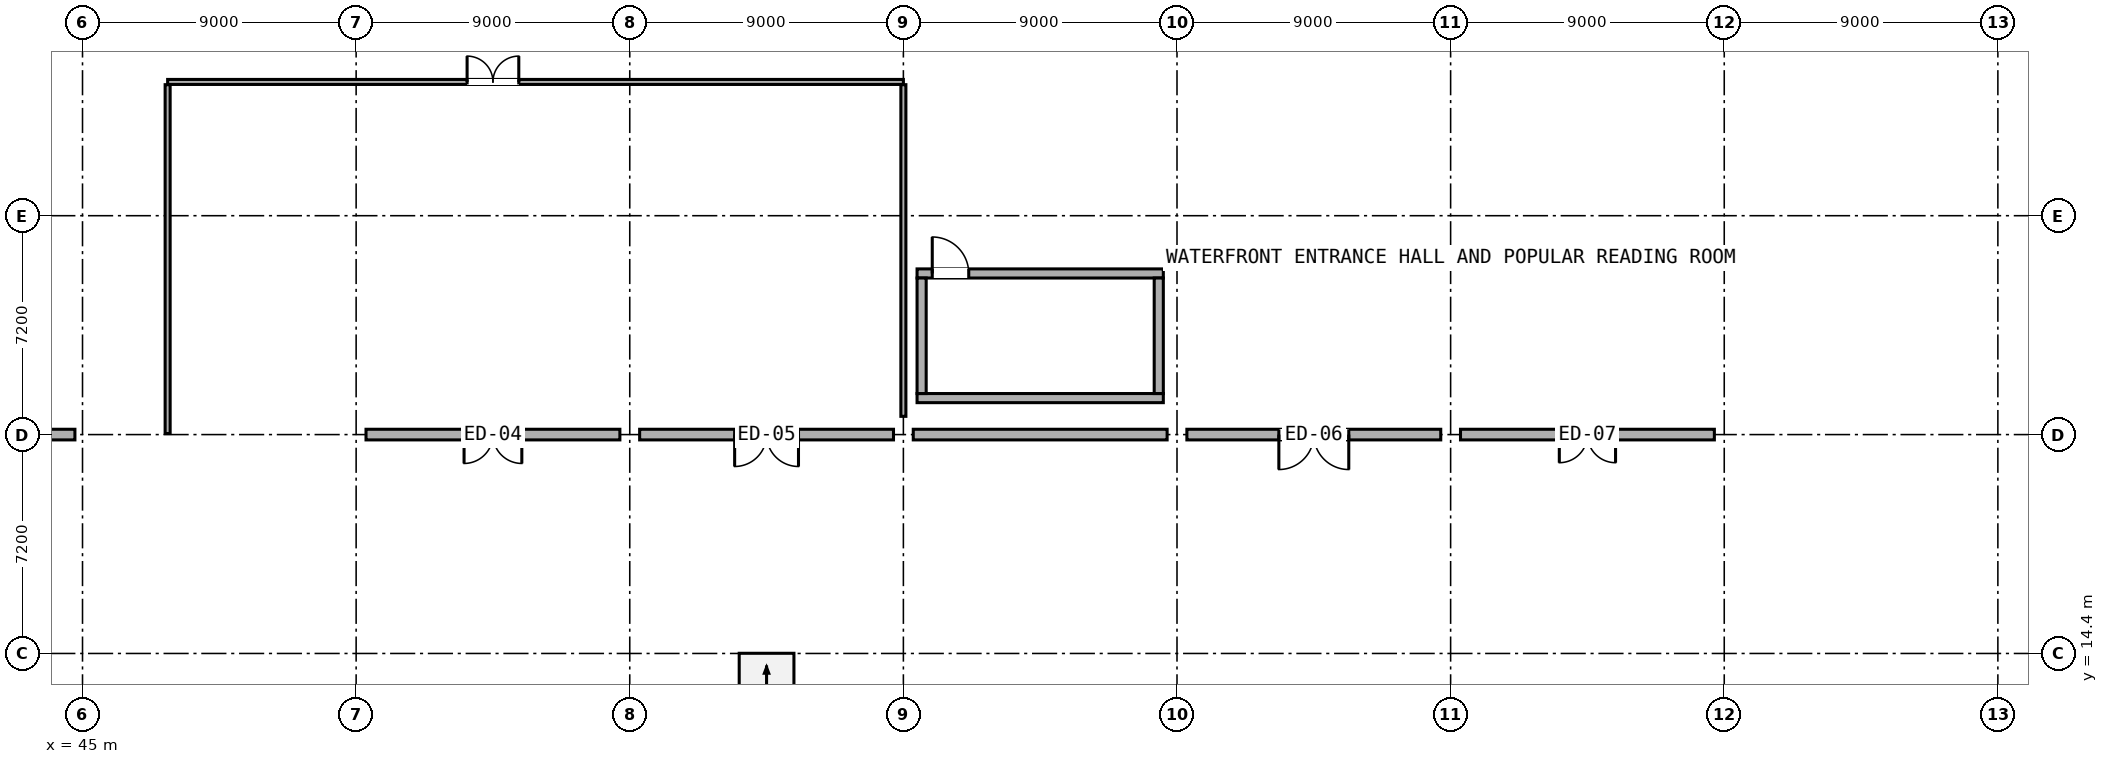
"""IFC4 building model, lengths in metres.
Left out: names, types, materials, properties, quantities, classifications, styles, units other than length and angle.
Written with IfcOpenShell. Run it as: python <this file> out.ifc"""

import sys

from ifc_helpers import new_model, si_unit, direction, frame, frame_2d, origin, origin_2d, place, context, subcontext, project, spatial, rectangle, hollow_rectangle, extrude, element, fill, save


model = new_model("IFC4")
c1 = context("Model", 3, precision=1e-05, world=origin(), true_north=direction((0.0, 1.0)))
c2 = subcontext(c1, "Body", "Model", "MODEL_VIEW")
j1 = project(units=[si_unit("LENGTHUNIT", "METRE"), si_unit("PLANEANGLEUNIT", "RADIAN")], contexts=[c1])
p1 = place(None, origin())
s1 = spatial("IfcSite", under=j1, at=p1, CompositionType="ELEMENT")
p2 = place(p1, origin())
s2 = spatial("IfcBuilding", under=s1, at=p2, CompositionType="ELEMENT")
p3 = place(p2, origin())
s3 = spatial("IfcBuildingStorey", under=s2, at=p3, CompositionType="ELEMENT", Elevation=0.0)
p4 = place(p3, frame((45.0, 14.4, 0.0), z_axis=(0.0, 0.0, 1.0), x_axis=(1.0, 0.0, 0.0)))
e1 = element("IfcColumn", 1, at=p4, inside=s3, PredefinedType="COLUMN", context=c2, shape_type="SweptSolid", body=[
    extrude(hollow_rectangle(XDim=0.5, YDim=0.5, WallThickness=0.022, at=origin_2d()), origin(), (0.0, 0.0, 1.0), 4.58),
])
for number, where, z_axis, x_axis in (
    (2, (45.0, 21.6, 0.0), (0.0, 0.0, 1.0), (1.0, 0.0, 0.0)),
    (3, (45.0, 28.8, 0.0), (0.0, 0.0, 1.0), (1.0, 0.0, 0.0)),
):
    element("IfcColumn", number, at=place(p3, frame(where, z_axis=z_axis, x_axis=x_axis)), inside=s3, PredefinedType="COLUMN", context=c2, shape_type="SweptSolid", body=[
        extrude(hollow_rectangle(XDim=0.5, YDim=0.5, WallThickness=0.022, at=origin_2d()), origin(), (0.0, 0.0, 1.0), 4.8),
    ])
p5 = place(p3, frame((54.0, 14.4, 0.0), z_axis=(0.0, 0.0, 1.0), x_axis=(1.0, 0.0, 0.0)))
e4 = element("IfcColumn", 4, at=p5, inside=s3, PredefinedType="COLUMN", context=c2, shape_type="SweptSolid", body=[
    extrude(hollow_rectangle(XDim=0.65, YDim=0.65, WallThickness=0.025, at=origin_2d()), origin(), (0.0, 0.0, 1.0), 4.58),
])
for number, where, z_axis, x_axis in (
    (5, (54.0, 21.6, 0.0), (0.0, 0.0, 1.0), (1.0, 0.0, 0.0)),
    (6, (54.0, 28.8, 0.0), (0.0, 0.0, 1.0), (1.0, 0.0, 0.0)),
):
    element("IfcColumn", number, at=place(p3, frame(where, z_axis=z_axis, x_axis=x_axis)), inside=s3, PredefinedType="COLUMN", context=c2, shape_type="SweptSolid", body=[
        extrude(hollow_rectangle(XDim=0.65, YDim=0.65, WallThickness=0.025, at=origin_2d()), origin(), (0.0, 0.0, 1.0), 4.8),
    ])
p6 = place(p3, frame((63.0, 14.4, 0.0), z_axis=(0.0, 0.0, 1.0), x_axis=(1.0, 0.0, 0.0)))
e7 = element("IfcColumn", 7, at=p6, inside=s3, PredefinedType="COLUMN", context=c2, shape_type="SweptSolid", body=[
    extrude(hollow_rectangle(XDim=0.65, YDim=0.65, WallThickness=0.025, at=origin_2d()), origin(), (0.0, 0.0, 1.0), 4.58),
])
for number, where, z_axis, x_axis in (
    (8, (63.0, 21.6, 0.0), (0.0, 0.0, 1.0), (1.0, 0.0, 0.0)),
    (9, (63.0, 28.8, 0.0), (0.0, 0.0, 1.0), (1.0, 0.0, 0.0)),
):
    element("IfcColumn", number, at=place(p3, frame(where, z_axis=z_axis, x_axis=x_axis)), inside=s3, PredefinedType="COLUMN", context=c2, shape_type="SweptSolid", body=[
        extrude(hollow_rectangle(XDim=0.65, YDim=0.65, WallThickness=0.025, at=origin_2d()), origin(), (0.0, 0.0, 1.0), 4.8),
    ])
p7 = place(p3, frame((72.0, 14.4, 0.0), z_axis=(0.0, 0.0, 1.0), x_axis=(1.0, 0.0, 0.0)))
e10 = element("IfcColumn", 10, at=p7, inside=s3, PredefinedType="COLUMN", context=c2, shape_type="SweptSolid", body=[
    extrude(hollow_rectangle(XDim=0.65, YDim=0.65, WallThickness=0.025, at=origin_2d()), origin(), (0.0, 0.0, 1.0), 4.58),
])
for number, where, z_axis, x_axis in (
    (11, (72.0, 21.6, 0.0), (0.0, 0.0, 1.0), (1.0, 0.0, 0.0)),
    (12, (72.0, 28.8, 0.0), (0.0, 0.0, 1.0), (1.0, 0.0, 0.0)),
):
    element("IfcColumn", number, at=place(p3, frame(where, z_axis=z_axis, x_axis=x_axis)), inside=s3, PredefinedType="COLUMN", context=c2, shape_type="SweptSolid", body=[
        extrude(hollow_rectangle(XDim=0.65, YDim=0.65, WallThickness=0.025, at=origin_2d()), origin(), (0.0, 0.0, 1.0), 4.8),
    ])
p8 = place(p3, frame((81.0, 14.4, 0.0), z_axis=(0.0, 0.0, 1.0), x_axis=(1.0, 0.0, 0.0)))
e13 = element("IfcColumn", 13, at=p8, inside=s3, PredefinedType="COLUMN", context=c2, shape_type="SweptSolid", body=[
    extrude(hollow_rectangle(XDim=0.65, YDim=0.65, WallThickness=0.025, at=origin_2d()), origin(), (0.0, 0.0, 1.0), 4.58),
])
for number, where, z_axis, x_axis in (
    (14, (81.0, 21.6, 0.0), (0.0, 0.0, 1.0), (1.0, 0.0, 0.0)),
    (15, (81.0, 28.8, 0.0), (0.0, 0.0, 1.0), (1.0, 0.0, 0.0)),
):
    element("IfcColumn", number, at=place(p3, frame(where, z_axis=z_axis, x_axis=x_axis)), inside=s3, PredefinedType="COLUMN", context=c2, shape_type="SweptSolid", body=[
        extrude(hollow_rectangle(XDim=0.65, YDim=0.65, WallThickness=0.025, at=origin_2d()), origin(), (0.0, 0.0, 1.0), 4.8),
    ])
p9 = place(p3, frame((90.0, 14.4, 0.0), z_axis=(0.0, 0.0, 1.0), x_axis=(1.0, 0.0, 0.0)))
e16 = element("IfcColumn", 16, at=p9, inside=s3, PredefinedType="COLUMN", context=c2, shape_type="SweptSolid", body=[
    extrude(hollow_rectangle(XDim=0.65, YDim=0.65, WallThickness=0.025, at=origin_2d()), origin(), (0.0, 0.0, 1.0), 4.58),
])
for number, where, z_axis, x_axis in (
    (17, (90.0, 21.6, 0.0), (0.0, 0.0, 1.0), (1.0, 0.0, 0.0)),
    (18, (90.0, 28.8, 0.0), (0.0, 0.0, 1.0), (1.0, 0.0, 0.0)),
):
    element("IfcColumn", number, at=place(p3, frame(where, z_axis=z_axis, x_axis=x_axis)), inside=s3, PredefinedType="COLUMN", context=c2, shape_type="SweptSolid", body=[
        extrude(hollow_rectangle(XDim=0.65, YDim=0.65, WallThickness=0.025, at=origin_2d()), origin(), (0.0, 0.0, 1.0), 4.8),
    ])
p10 = place(p3, frame((99.0, 14.4, 0.0), z_axis=(0.0, 0.0, 1.0), x_axis=(1.0, 0.0, 0.0)))
e19 = element("IfcColumn", 19, at=p10, inside=s3, PredefinedType="COLUMN", context=c2, shape_type="SweptSolid", body=[
    extrude(hollow_rectangle(XDim=0.65, YDim=0.65, WallThickness=0.025, at=origin_2d()), origin(), (0.0, 0.0, 1.0), 4.58),
])
for number, where, z_axis, x_axis in (
    (20, (99.0, 21.6, 0.0), (0.0, 0.0, 1.0), (1.0, 0.0, 0.0)),
    (21, (99.0, 28.8, 0.0), (0.0, 0.0, 1.0), (1.0, 0.0, 0.0)),
):
    element("IfcColumn", number, at=place(p3, frame(where, z_axis=z_axis, x_axis=x_axis)), inside=s3, PredefinedType="COLUMN", context=c2, shape_type="SweptSolid", body=[
        extrude(hollow_rectangle(XDim=0.65, YDim=0.65, WallThickness=0.025, at=origin_2d()), origin(), (0.0, 0.0, 1.0), 4.8),
    ])
p11 = place(p3, frame((108.0, 14.4, 0.0), z_axis=(0.0, 0.0, 1.0), x_axis=(1.0, 0.0, 0.0)))
e22 = element("IfcColumn", 22, at=p11, inside=s3, PredefinedType="COLUMN", context=c2, shape_type="SweptSolid", body=[
    extrude(hollow_rectangle(XDim=0.5, YDim=0.5, WallThickness=0.022, at=origin_2d()), origin(), (0.0, 0.0, 1.0), 4.58),
])
for number, where, z_axis, x_axis in (
    (23, (108.0, 21.6, 0.0), (0.0, 0.0, 1.0), (1.0, 0.0, 0.0)),
    (24, (108.0, 28.8, 0.0), (0.0, 0.0, 1.0), (1.0, 0.0, 0.0)),
):
    element("IfcColumn", number, at=place(p3, frame(where, z_axis=z_axis, x_axis=x_axis)), inside=s3, PredefinedType="COLUMN", context=c2, shape_type="SweptSolid", body=[
        extrude(hollow_rectangle(XDim=0.5, YDim=0.5, WallThickness=0.022, at=origin_2d()), origin(), (0.0, 0.0, 1.0), 4.8),
    ])
p12 = place(p3, frame((36.25, 21.6, 0.0), z_axis=(0.0, 0.0, 1.0), x_axis=(1.0, 0.0, 0.0)))
e25 = element("IfcWall", 25, at=p12, inside=s3, PredefinedType="STANDARD", context=c2, shape_type="SweptSolid", body=[
    extrude(rectangle(XDim=8.5, YDim=0.35, at=frame_2d((4.25, 0.0))), origin(), (0.0, 0.0, 1.0), 4.055),
])
p13 = place(p12, frame((3.05, 0.0, 0.0)))
e26 = element("IfcOpeningElement", 26, at=p13, cuts=e25, PredefinedType="OPENING", context=c2, shape_type="SweptSolid", body=[
    extrude(rectangle(XDim=2.4, YDim=2.55, at=frame_2d((1.2, 1.275))), frame((0.0, 0.187, 0.0), z_axis=(0.0, -1.0, 0.0), x_axis=(1.0, 0.0, 0.0)), (0.0, 0.0, 1.0), 0.374),
])
p14 = place(p3, frame((54.325, 21.6, 0.0), z_axis=(0.0, 0.0, 1.0), x_axis=(1.0, 0.0, 0.0)))
e27 = element("IfcWall", 27, at=p14, inside=s3, PredefinedType="STANDARD", context=c2, shape_type="SweptSolid", body=[
    extrude(rectangle(XDim=8.35, YDim=0.35, at=frame_2d((4.175, 0.0))), origin(), (0.0, 0.0, 1.0), 3.955),
])
p15 = place(p14, frame((3.225, 0.0, 0.0)))
e28 = element("IfcOpeningElement", 28, at=p15, cuts=e27, PredefinedType="OPENING", context=c2, shape_type="SweptSolid", body=[
    extrude(rectangle(XDim=1.9, YDim=2.4, at=frame_2d((0.95, 1.2))), frame((0.0, 0.187, 0.0), z_axis=(0.0, -1.0, 0.0), x_axis=(1.0, 0.0, 0.0)), (0.0, 0.0, 1.0), 0.374),
])
p16 = place(p3, frame((63.325, 21.6, 0.0), z_axis=(0.0, 0.0, 1.0), x_axis=(1.0, 0.0, 0.0)))
e29 = element("IfcWall", 29, at=p16, inside=s3, PredefinedType="STANDARD", context=c2, shape_type="SweptSolid", body=[
    extrude(rectangle(XDim=8.35, YDim=0.35, at=frame_2d((4.175, 0.0))), origin(), (0.0, 0.0, 1.0), 3.955),
])
p17 = place(p16, frame((3.125, 0.0, 0.0)))
e30 = element("IfcOpeningElement", 30, at=p17, cuts=e29, PredefinedType="OPENING", context=c2, shape_type="SweptSolid", body=[
    extrude(rectangle(XDim=2.1, YDim=2.45, at=frame_2d((1.05, 1.225))), frame((0.0, 0.187, 0.0), z_axis=(0.0, -1.0, 0.0), x_axis=(1.0, 0.0, 0.0)), (0.0, 0.0, 1.0), 0.374),
])
p18 = place(p3, frame((72.325, 21.6, 0.0), z_axis=(0.0, 0.0, 1.0), x_axis=(1.0, 0.0, 0.0)))
e31 = element("IfcWall", 31, at=p18, inside=s3, PredefinedType="STANDARD", context=c2, shape_type="SweptSolid", body=[
    extrude(rectangle(XDim=8.35, YDim=0.35, at=frame_2d((4.175, 0.0))), origin(), (0.0, 0.0, 1.0), 3.955),
])
p19 = place(p3, frame((81.325, 21.6, 0.0), z_axis=(0.0, 0.0, 1.0), x_axis=(1.0, 0.0, 0.0)))
e32 = element("IfcWall", 32, at=p19, inside=s3, PredefinedType="STANDARD", context=c2, shape_type="SweptSolid", body=[
    extrude(rectangle(XDim=8.35, YDim=0.35, at=frame_2d((4.175, 0.0))), origin(), (0.0, 0.0, 1.0), 3.955),
])
p20 = place(p19, frame((3.025, 0.0, 0.0)))
e33 = element("IfcOpeningElement", 33, at=p20, cuts=e32, PredefinedType="OPENING", context=c2, shape_type="SweptSolid", body=[
    extrude(rectangle(XDim=2.3, YDim=2.5, at=frame_2d((1.15, 1.25))), frame((0.0, 0.187, 0.0), z_axis=(0.0, -1.0, 0.0), x_axis=(1.0, 0.0, 0.0)), (0.0, 0.0, 1.0), 0.374),
])
p21 = place(p3, frame((90.325, 21.6, 0.0), z_axis=(0.0, 0.0, 1.0), x_axis=(1.0, 0.0, 0.0)))
e34 = element("IfcWall", 34, at=p21, inside=s3, PredefinedType="STANDARD", context=c2, shape_type="SweptSolid", body=[
    extrude(rectangle(XDim=8.35, YDim=0.35, at=frame_2d((4.175, 0.0))), origin(), (0.0, 0.0, 1.0), 3.955),
])
p22 = place(p21, frame((3.25, 0.0, 0.0)))
e35 = element("IfcOpeningElement", 35, at=p22, cuts=e34, PredefinedType="OPENING", context=c2, shape_type="SweptSolid", body=[
    extrude(rectangle(XDim=1.85, YDim=2.35, at=frame_2d((0.925, 1.175))), frame((0.0, 0.187, 0.0), z_axis=(0.0, -1.0, 0.0), x_axis=(1.0, 0.0, 0.0)), (0.0, 0.0, 1.0), 0.374),
])
p23 = place(p3, frame((72.45, 22.8, 0.0), z_axis=(0.0, 0.0, 1.0), x_axis=(1.0, 0.0, 0.0)))
e36 = element("IfcWall", 36, at=p23, inside=s3, PredefinedType="SHEAR", context=c2, shape_type="SweptSolid", body=[
    extrude(rectangle(XDim=8.1, YDim=0.3, at=frame_2d((4.05, 0.0))), origin(), (0.0, 0.0, 1.0), 4.555),
])
p24 = place(p3, frame((72.45, 26.9, 0.0), z_axis=(0.0, 0.0, 1.0), x_axis=(1.0, 0.0, 0.0)))
e37 = element("IfcWall", 37, at=p24, inside=s3, PredefinedType="SHEAR", context=c2, shape_type="SweptSolid", body=[
    extrude(rectangle(XDim=8.1, YDim=0.3, at=frame_2d((4.05, 0.0))), origin(), (0.0, 0.0, 1.0), 4.555),
])
p25 = place(p24, frame((0.5, 0.0, 0.0)))
e38 = element("IfcOpeningElement", 38, at=p25, cuts=e37, PredefinedType="OPENING", context=c2, shape_type="SweptSolid", body=[
    extrude(rectangle(XDim=1.2, YDim=2.1, at=frame_2d((0.6, 1.05))), frame((0.0, 0.162, 0.0), z_axis=(0.0, -1.0, 0.0), x_axis=(1.0, 0.0, 0.0)), (0.0, 0.0, 1.0), 0.324),
])
for number, where, z_axis, x_axis in (
    (39, (72.6, 22.95, 0.0), (0.0, 0.0, 1.0), (0.0, 1.0, 0.0)),
    (40, (80.4, 22.95, 0.0), (0.0, 0.0, 1.0), (0.0, 1.0, 0.0)),
):
    element("IfcWall", number, at=place(p3, frame(where, z_axis=z_axis, x_axis=x_axis)), inside=s3, PredefinedType="SHEAR", context=c2, shape_type="SweptSolid", body=[
        extrude(rectangle(XDim=3.8, YDim=0.3, at=frame_2d((1.9, 0.0))), origin(), (0.0, 0.0, 1.0), 4.555),
    ])
p26 = place(p3, frame((47.8, 33.2, 0.0), z_axis=(0.0, 0.0, 1.0), x_axis=(1.0, 0.0, 0.0)))
e41 = element("IfcWall", 41, at=p26, inside=s3, PredefinedType="PARTITIONING", context=c2, shape_type="SweptSolid", body=[
    extrude(rectangle(XDim=24.2, YDim=0.165, at=frame_2d((12.1, 0.0))), origin(), (0.0, 0.0, 1.0), 4.555),
])
p27 = place(p26, frame((9.85, 0.0, 0.0)))
e42 = element("IfcOpeningElement", 42, at=p27, cuts=e41, PredefinedType="OPENING", context=c2, shape_type="SweptSolid", body=[
    extrude(rectangle(XDim=1.7, YDim=2.12, at=frame_2d((0.85, 1.06))), frame((0.0, 0.094, 0.0), z_axis=(0.0, -1.0, 0.0), x_axis=(1.0, 0.0, 0.0)), (0.0, 0.0, 1.0), 0.189),
])
p28 = place(p3, frame((47.8, 21.635, 0.0), z_axis=(0.0, 0.0, 1.0), x_axis=(0.0, 1.0, 0.0)))
e43 = element("IfcWall", 43, at=p28, inside=s3, PredefinedType="PARTITIONING", context=c2, shape_type="SweptSolid", body=[
    extrude(rectangle(XDim=11.475, YDim=0.165, at=frame_2d((5.738, 0.0))), origin(), (0.0, 0.0, 1.0), 4.555),
])
p29 = place(p3, frame((72.0, 22.2, 0.0), z_axis=(0.0, 0.0, 1.0), x_axis=(0.0, 1.0, 0.0)))
e44 = element("IfcWall", 44, at=p29, inside=s3, PredefinedType="PARTITIONING", context=c2, shape_type="SweptSolid", body=[
    extrude(rectangle(XDim=10.91, YDim=0.165, at=frame_2d((5.455, 0.0))), origin(), (0.0, 0.0, 1.0), 3.835),
])
p30 = place(p15, frame((1.9, 0.0, 0.0), z_axis=(0.0, 0.0, 1.0), x_axis=(-1.0, 0.0, 0.0)))
e45 = element("IfcDoor", 45, at=p30, inside=s3, OperationType="DOUBLE_DOOR_SINGLE_SWING", PredefinedType="DOOR", context=c2, shape_type="SweptSolid", body=[
    extrude(rectangle(XDim=1.9, YDim=2.4, at=frame_2d((0.95, 1.2))), frame((0.0, 0.025, 0.0), z_axis=(0.0, -1.0, 0.0), x_axis=(1.0, 0.0, 0.0)), (0.0, 0.0, 1.0), 0.05),
])
fill(e28, e45)
p31 = place(p17, frame((2.1, 0.0, 0.0), z_axis=(0.0, 0.0, 1.0), x_axis=(-1.0, 0.0, 0.0)))
e46 = element("IfcDoor", 46, at=p31, inside=s3, OperationType="DOUBLE_DOOR_SINGLE_SWING", PredefinedType="DOOR", context=c2, shape_type="SweptSolid", body=[
    extrude(rectangle(XDim=2.1, YDim=2.45, at=frame_2d((1.05, 1.225))), frame((0.0, 0.025, 0.0), z_axis=(0.0, -1.0, 0.0), x_axis=(1.0, 0.0, 0.0)), (0.0, 0.0, 1.0), 0.05),
])
fill(e30, e46)
p32 = place(p20, frame((2.3, 0.0, 0.0), z_axis=(0.0, 0.0, 1.0), x_axis=(-1.0, 0.0, 0.0)))
e47 = element("IfcDoor", 47, at=p32, inside=s3, OperationType="DOUBLE_DOOR_SINGLE_SWING", PredefinedType="DOOR", context=c2, shape_type="SweptSolid", body=[
    extrude(rectangle(XDim=2.3, YDim=2.5, at=frame_2d((1.15, 1.25))), frame((0.0, 0.025, 0.0), z_axis=(0.0, -1.0, 0.0), x_axis=(1.0, 0.0, 0.0)), (0.0, 0.0, 1.0), 0.05),
])
fill(e33, e47)
p33 = place(p22, frame((1.85, 0.0, 0.0), z_axis=(0.0, 0.0, 1.0), x_axis=(-1.0, 0.0, 0.0)))
e48 = element("IfcDoor", 48, at=p33, inside=s3, OperationType="DOUBLE_DOOR_SINGLE_SWING", PredefinedType="DOOR", context=c2, shape_type="SweptSolid", body=[
    extrude(rectangle(XDim=1.85, YDim=2.35, at=frame_2d((0.925, 1.175))), frame((0.0, 0.025, 0.0), z_axis=(0.0, -1.0, 0.0), x_axis=(1.0, 0.0, 0.0)), (0.0, 0.0, 1.0), 0.05),
])
fill(e35, e48)
p34 = place(p25, origin())
e49 = element("IfcDoor", 49, at=p34, inside=s3, OperationType="SINGLE_SWING_LEFT", PredefinedType="DOOR", context=c2, shape_type="SweptSolid", body=[
    extrude(rectangle(XDim=1.2, YDim=2.1, at=frame_2d((0.6, 1.05))), frame((0.0, 0.025, 0.0), z_axis=(0.0, -1.0, 0.0), x_axis=(1.0, 0.0, 0.0)), (0.0, 0.0, 1.0), 0.05),
])
fill(e38, e49)
p35 = place(p27, origin())
e50 = element("IfcDoor", 50, at=p35, inside=s3, OperationType="DOUBLE_DOOR_SINGLE_SWING", PredefinedType="DOOR", context=c2, shape_type="SweptSolid", body=[
    extrude(rectangle(XDim=1.7, YDim=2.12, at=frame_2d((0.85, 1.06))), frame((0.0, 0.025, 0.0), z_axis=(0.0, -1.0, 0.0), x_axis=(1.0, 0.0, 0.0)), (0.0, 0.0, 1.0), 0.05),
])
fill(e42, e50)
save(model, sys.argv[1])
